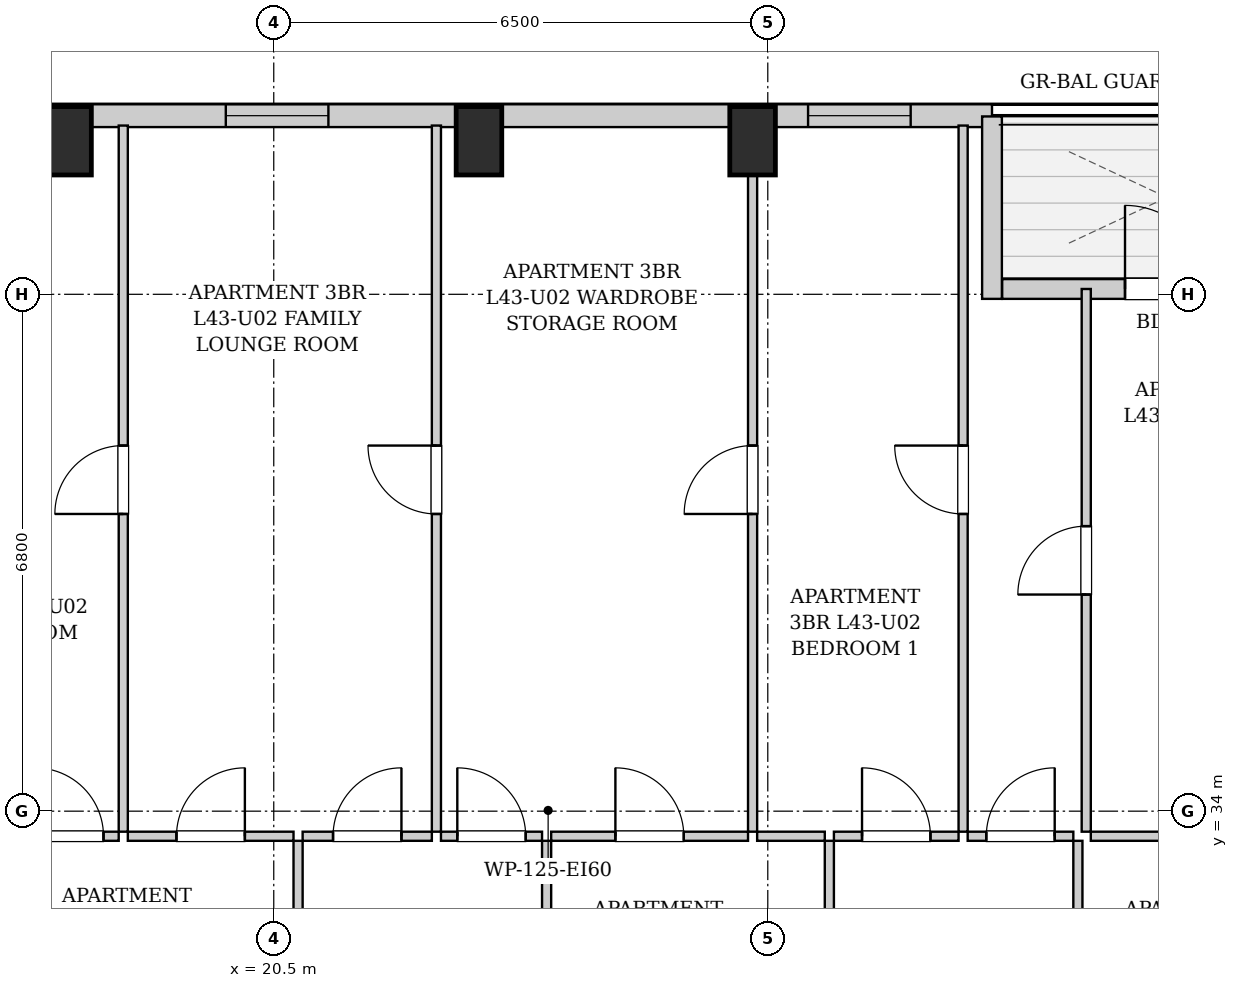
"""IFC4 building model, lengths in metres.
Left out: names, types, materials, properties, quantities, classifications, styles, units other than length and angle.
Written with IfcOpenShell. Run it as: python <this file> out.ifc"""

import sys

from ifc_helpers import new_model, si_unit, direction, frame, frame_2d, origin, origin_2d, place, context, subcontext, project, spatial, rectangle, extrude, element, fill, save


model = new_model("IFC4")
c1 = context("Model", 3, precision=1e-05, world=origin(), true_north=direction((0.0, 1.0)))
c2 = subcontext(c1, "Body", "Model", "MODEL_VIEW")
j1 = project(units=[si_unit("LENGTHUNIT", "METRE"), si_unit("PLANEANGLEUNIT", "RADIAN")], contexts=[c1])
p1 = place(None, origin())
s1 = spatial("IfcSite", under=j1, at=p1, CompositionType="ELEMENT")
p2 = place(p1, origin())
s2 = spatial("IfcBuilding", under=s1, at=p2, CompositionType="ELEMENT")
p3 = place(p2, frame((0.0, 0.0, 150.4)))
s3 = spatial("IfcBuildingStorey", under=s2, at=p3, CompositionType="ELEMENT", Elevation=150.4)
for number, where, z_axis, x_axis in (
    (1, (17.8, 42.82, 0.0), (0.0, 0.0, 1.0), (1.0, 0.0, 0.0)),
    (2, (23.2, 42.82, 0.0), (0.0, 0.0, 1.0), (1.0, 0.0, 0.0)),
    (3, (26.8, 42.82, 0.0), (0.0, 0.0, 1.0), (1.0, 0.0, 0.0)),
):
    element("IfcColumn", number, at=place(p3, frame(where, z_axis=z_axis, x_axis=x_axis)), inside=s3, PredefinedType="COLUMN", context=c2, shape_type="SweptSolid", body=[
        extrude(rectangle(XDim=0.6, YDim=0.9, at=origin_2d()), origin(), (0.0, 0.0, 1.0), 3.25),
    ])
p4 = place(p3, frame((16.6, 43.15, 0.0), z_axis=(0.0, 0.0, 1.0), x_axis=(1.0, 0.0, 0.0)))
e4 = element("IfcWall", 4, at=p4, inside=s3, PredefinedType="SOLIDWALL", context=c2, shape_type="SweptSolid", body=[
    extrude(rectangle(XDim=13.35, YDim=0.3, at=frame_2d((6.675, 0.0))), origin(), (0.0, 0.0, 1.0), 2.99),
])
p5 = place(p4, frame((3.269, 0.0, 0.55)))
e5 = element("IfcOpeningElement", 5, at=p5, cuts=e4, PredefinedType="OPENING", context=c2, shape_type="SweptSolid", body=[
    extrude(rectangle(XDim=1.35, YDim=1.2, at=frame_2d((0.675, 0.6))), frame((0.0, 0.16, 0.0), z_axis=(0.0, -1.0, 0.0), x_axis=(1.0, 0.0, 0.0)), (0.0, 0.0, 1.0), 0.32),
])
p6 = place(p4, frame((10.93, 0.0, 0.55)))
e6 = element("IfcOpeningElement", 6, at=p6, cuts=e4, PredefinedType="OPENING", context=c2, shape_type="SweptSolid", body=[
    extrude(rectangle(XDim=1.35, YDim=1.2, at=frame_2d((0.675, 0.6))), frame((0.0, 0.16, 0.0), z_axis=(0.0, -1.0, 0.0), x_axis=(1.0, 0.0, 0.0)), (0.0, 0.0, 1.0), 0.32),
])
p7 = place(p3, frame((29.95, 43.14, 0.0), z_axis=(0.0, 0.0, 1.0), x_axis=(0.0, -1.0, 0.0)))
e7 = element("IfcWall", 7, at=p7, inside=s3, PredefinedType="SOLIDWALL", context=c2, shape_type="SweptSolid", body=[
    extrude(rectangle(XDim=2.4, YDim=0.26, at=frame_2d((1.2, 0.0))), origin(), (0.0, 0.0, 1.0), 2.99),
])
p8 = place(p3, frame((30.084, 40.87, 0.0), z_axis=(0.0, 0.0, 1.0), x_axis=(1.0, 0.0, 0.0)))
e8 = element("IfcWall", 8, at=p8, inside=s3, PredefinedType="SOLIDWALL", context=c2, shape_type="SweptSolid", body=[
    extrude(rectangle(XDim=4.332, YDim=0.26, at=frame_2d((2.166, 0.0))), origin(), (0.0, 0.0, 1.0), 2.99),
])
p9 = place(p8, frame((1.616, 0.0, 0.0)))
e9 = element("IfcOpeningElement", 9, at=p9, cuts=e8, PredefinedType="OPENING", context=c2, shape_type="SweptSolid", body=[
    extrude(rectangle(XDim=1.1, YDim=2.0, at=frame_2d((0.55, 1.0))), frame((0.0, 0.14, 0.0), z_axis=(0.0, -1.0, 0.0), x_axis=(1.0, 0.0, 0.0)), (0.0, 0.0, 1.0), 0.28),
])
p10 = place(p8, frame((2.876, 0.0, 0.55)))
e10 = element("IfcOpeningElement", 10, at=p10, cuts=e8, PredefinedType="OPENING", context=c2, shape_type="SweptSolid", body=[
    extrude(rectangle(XDim=0.85, YDim=1.2, at=frame_2d((0.425, 0.6))), frame((0.0, 0.14, 0.0), z_axis=(0.0, -1.0, 0.0), x_axis=(1.0, 0.0, 0.0)), (0.0, 0.0, 1.0), 0.28),
])
p11 = place(p3, frame((20.82, 30.76, 0.0), z_axis=(0.0, 0.0, 1.0), x_axis=(0.0, 1.0, 0.0)))
e11 = element("IfcWall", 11, at=p11, inside=s3, PredefinedType="PARTITIONING", context=c2, shape_type="SweptSolid", body=[
    extrude(rectangle(XDim=2.85, YDim=0.12, at=frame_2d((1.425, 0.0))), origin(), (0.0, 0.0, 1.0), 2.99),
])
p12 = place(p11, frame((0.975, 0.0, 0.0)))
e12 = element("IfcOpeningElement", 12, at=p12, cuts=e11, PredefinedType="OPENING", context=c2, shape_type="SweptSolid", body=[
    extrude(rectangle(XDim=0.9, YDim=2.05, at=frame_2d((0.45, 1.025))), frame((0.0, 0.07, 0.0), z_axis=(0.0, -1.0, 0.0), x_axis=(1.0, 0.0, 0.0)), (0.0, 0.0, 1.0), 0.14),
])
p13 = place(p3, frame((17.16, 33.67, 0.0), z_axis=(0.0, 0.0, 1.0), x_axis=(1.0, 0.0, 0.0)))
e13 = element("IfcWall", 13, at=p13, inside=s3, PredefinedType="PARTITIONING", context=c2, shape_type="SweptSolid", body=[
    extrude(rectangle(XDim=1.3, YDim=0.12, at=frame_2d((0.65, 0.0))), origin(), (0.0, 0.0, 1.0), 2.99),
])
p14 = place(p13, frame((0.2, 0.0, 0.0)))
e14 = element("IfcOpeningElement", 14, at=p14, cuts=e13, PredefinedType="OPENING", context=c2, shape_type="SweptSolid", body=[
    extrude(rectangle(XDim=0.9, YDim=2.05, at=frame_2d((0.45, 1.025))), frame((0.0, 0.07, 0.0), z_axis=(0.0, -1.0, 0.0), x_axis=(1.0, 0.0, 0.0)), (0.0, 0.0, 1.0), 0.14),
])
p15 = place(p3, frame((18.58, 33.67, 0.0), z_axis=(0.0, 0.0, 1.0), x_axis=(1.0, 0.0, 0.0)))
e15 = element("IfcWall", 15, at=p15, inside=s3, PredefinedType="PARTITIONING", context=c2, shape_type="SweptSolid", body=[
    extrude(rectangle(XDim=2.18, YDim=0.12, at=frame_2d((1.09, 0.0))), origin(), (0.0, 0.0, 1.0), 2.99),
])
p16 = place(p15, frame((0.64, 0.0, 0.0)))
e16 = element("IfcOpeningElement", 16, at=p16, cuts=e15, PredefinedType="OPENING", context=c2, shape_type="SweptSolid", body=[
    extrude(rectangle(XDim=0.9, YDim=2.05, at=frame_2d((0.45, 1.025))), frame((0.0, 0.07, 0.0), z_axis=(0.0, -1.0, 0.0), x_axis=(1.0, 0.0, 0.0)), (0.0, 0.0, 1.0), 0.14),
])
p17 = place(p3, frame((24.09, 30.76, 0.0), z_axis=(0.0, 0.0, 1.0), x_axis=(0.0, 1.0, 0.0)))
e17 = element("IfcWall", 17, at=p17, inside=s3, PredefinedType="PARTITIONING", context=c2, shape_type="SweptSolid", body=[
    extrude(rectangle(XDim=2.85, YDim=0.12, at=frame_2d((1.425, 0.0))), origin(), (0.0, 0.0, 1.0), 2.99),
])
p18 = place(p17, frame((0.975, 0.0, 0.0)))
e18 = element("IfcOpeningElement", 18, at=p18, cuts=e17, PredefinedType="OPENING", context=c2, shape_type="SweptSolid", body=[
    extrude(rectangle(XDim=0.9, YDim=2.05, at=frame_2d((0.45, 1.025))), frame((0.0, 0.07, 0.0), z_axis=(0.0, -1.0, 0.0), x_axis=(1.0, 0.0, 0.0)), (0.0, 0.0, 1.0), 0.14),
])
p19 = place(p3, frame((20.88, 33.67, 0.0), z_axis=(0.0, 0.0, 1.0), x_axis=(1.0, 0.0, 0.0)))
e19 = element("IfcWall", 19, at=p19, inside=s3, PredefinedType="PARTITIONING", context=c2, shape_type="SweptSolid", body=[
    extrude(rectangle(XDim=1.7, YDim=0.12, at=frame_2d((0.85, 0.0))), origin(), (0.0, 0.0, 1.0), 2.99),
])
p20 = place(p19, frame((0.4, 0.0, 0.0)))
e20 = element("IfcOpeningElement", 20, at=p20, cuts=e19, PredefinedType="OPENING", context=c2, shape_type="SweptSolid", body=[
    extrude(rectangle(XDim=0.9, YDim=2.05, at=frame_2d((0.45, 1.025))), frame((0.0, 0.07, 0.0), z_axis=(0.0, -1.0, 0.0), x_axis=(1.0, 0.0, 0.0)), (0.0, 0.0, 1.0), 0.14),
])
p21 = place(p3, frame((22.7, 33.67, 0.0), z_axis=(0.0, 0.0, 1.0), x_axis=(1.0, 0.0, 0.0)))
e21 = element("IfcWall", 21, at=p21, inside=s3, PredefinedType="PARTITIONING", context=c2, shape_type="SweptSolid", body=[
    extrude(rectangle(XDim=1.33, YDim=0.12, at=frame_2d((0.665, 0.0))), origin(), (0.0, 0.0, 1.0), 2.99),
])
p22 = place(p21, frame((0.215, 0.0, 0.0)))
e22 = element("IfcOpeningElement", 22, at=p22, cuts=e21, PredefinedType="OPENING", context=c2, shape_type="SweptSolid", body=[
    extrude(rectangle(XDim=0.9, YDim=2.05, at=frame_2d((0.45, 1.025))), frame((0.0, 0.07, 0.0), z_axis=(0.0, -1.0, 0.0), x_axis=(1.0, 0.0, 0.0)), (0.0, 0.0, 1.0), 0.14),
])
p23 = place(p3, frame((27.81, 30.76, 0.0), z_axis=(0.0, 0.0, 1.0), x_axis=(0.0, 1.0, 0.0)))
e23 = element("IfcWall", 23, at=p23, inside=s3, PredefinedType="PARTITIONING", context=c2, shape_type="SweptSolid", body=[
    extrude(rectangle(XDim=2.85, YDim=0.12, at=frame_2d((1.425, 0.0))), origin(), (0.0, 0.0, 1.0), 2.99),
])
p24 = place(p23, frame((0.975, 0.0, 0.0)))
e24 = element("IfcOpeningElement", 24, at=p24, cuts=e23, PredefinedType="OPENING", context=c2, shape_type="SweptSolid", body=[
    extrude(rectangle(XDim=0.9, YDim=2.05, at=frame_2d((0.45, 1.025))), frame((0.0, 0.07, 0.0), z_axis=(0.0, -1.0, 0.0), x_axis=(1.0, 0.0, 0.0)), (0.0, 0.0, 1.0), 0.14),
])
p25 = place(p3, frame((24.15, 33.67, 0.0), z_axis=(0.0, 0.0, 1.0), x_axis=(1.0, 0.0, 0.0)))
e25 = element("IfcWall", 25, at=p25, inside=s3, PredefinedType="PARTITIONING", context=c2, shape_type="SweptSolid", body=[
    extrude(rectangle(XDim=2.59, YDim=0.12, at=frame_2d((1.295, 0.0))), origin(), (0.0, 0.0, 1.0), 2.99),
])
p26 = place(p25, frame((0.845, 0.0, 0.0)))
e26 = element("IfcOpeningElement", 26, at=p26, cuts=e25, PredefinedType="OPENING", context=c2, shape_type="SweptSolid", body=[
    extrude(rectangle(XDim=0.9, YDim=2.05, at=frame_2d((0.45, 1.025))), frame((0.0, 0.07, 0.0), z_axis=(0.0, -1.0, 0.0), x_axis=(1.0, 0.0, 0.0)), (0.0, 0.0, 1.0), 0.14),
])
p27 = place(p3, frame((26.86, 33.67, 0.0), z_axis=(0.0, 0.0, 1.0), x_axis=(1.0, 0.0, 0.0)))
e27 = element("IfcWall", 27, at=p27, inside=s3, PredefinedType="PARTITIONING", context=c2, shape_type="SweptSolid", body=[
    extrude(rectangle(XDim=0.89, YDim=0.12, at=frame_2d((0.445, 0.0))), origin(), (0.0, 0.0, 1.0), 2.99),
])
p28 = place(p3, frame((31.08, 30.76, 0.0), z_axis=(0.0, 0.0, 1.0), x_axis=(0.0, 1.0, 0.0)))
e28 = element("IfcWall", 28, at=p28, inside=s3, PredefinedType="PARTITIONING", context=c2, shape_type="SweptSolid", body=[
    extrude(rectangle(XDim=2.85, YDim=0.12, at=frame_2d((1.425, 0.0))), origin(), (0.0, 0.0, 1.0), 2.99),
])
p29 = place(p28, frame((0.975, 0.0, 0.0)))
e29 = element("IfcOpeningElement", 29, at=p29, cuts=e28, PredefinedType="OPENING", context=c2, shape_type="SweptSolid", body=[
    extrude(rectangle(XDim=0.9, YDim=2.05, at=frame_2d((0.45, 1.025))), frame((0.0, 0.07, 0.0), z_axis=(0.0, -1.0, 0.0), x_axis=(1.0, 0.0, 0.0)), (0.0, 0.0, 1.0), 0.14),
])
p30 = place(p3, frame((27.87, 33.67, 0.0), z_axis=(0.0, 0.0, 1.0), x_axis=(1.0, 0.0, 0.0)))
e30 = element("IfcWall", 30, at=p30, inside=s3, PredefinedType="PARTITIONING", context=c2, shape_type="SweptSolid", body=[
    extrude(rectangle(XDim=1.64, YDim=0.12, at=frame_2d((0.82, 0.0))), origin(), (0.0, 0.0, 1.0), 2.99),
])
p31 = place(p30, frame((0.37, 0.0, 0.0)))
e31 = element("IfcOpeningElement", 31, at=p31, cuts=e30, PredefinedType="OPENING", context=c2, shape_type="SweptSolid", body=[
    extrude(rectangle(XDim=0.9, YDim=2.05, at=frame_2d((0.45, 1.025))), frame((0.0, 0.07, 0.0), z_axis=(0.0, -1.0, 0.0), x_axis=(1.0, 0.0, 0.0)), (0.0, 0.0, 1.0), 0.14),
])
p32 = place(p3, frame((29.63, 33.67, 0.0), z_axis=(0.0, 0.0, 1.0), x_axis=(1.0, 0.0, 0.0)))
e32 = element("IfcWall", 32, at=p32, inside=s3, PredefinedType="PARTITIONING", context=c2, shape_type="SweptSolid", body=[
    extrude(rectangle(XDim=1.39, YDim=0.12, at=frame_2d((0.695, 0.0))), origin(), (0.0, 0.0, 1.0), 2.99),
])
p33 = place(p32, frame((0.245, 0.0, 0.0)))
e33 = element("IfcOpeningElement", 33, at=p33, cuts=e32, PredefinedType="OPENING", context=c2, shape_type="SweptSolid", body=[
    extrude(rectangle(XDim=0.9, YDim=2.05, at=frame_2d((0.45, 1.025))), frame((0.0, 0.07, 0.0), z_axis=(0.0, -1.0, 0.0), x_axis=(1.0, 0.0, 0.0)), (0.0, 0.0, 1.0), 0.14),
])
p34 = place(p3, frame((31.25, 33.67, 0.0), z_axis=(0.0, 0.0, 1.0), x_axis=(1.0, 0.0, 0.0)))
e34 = element("IfcWall", 34, at=p34, inside=s3, PredefinedType="PARTITIONING", context=c2, shape_type="SweptSolid", body=[
    extrude(rectangle(XDim=3.44, YDim=0.12, at=frame_2d((1.72, 0.0))), origin(), (0.0, 0.0, 1.0), 2.99),
])
p35 = place(p34, frame((1.27, 0.0, 0.0)))
e35 = element("IfcOpeningElement", 35, at=p35, cuts=e34, PredefinedType="OPENING", context=c2, shape_type="SweptSolid", body=[
    extrude(rectangle(XDim=0.9, YDim=2.05, at=frame_2d((0.45, 1.025))), frame((0.0, 0.07, 0.0), z_axis=(0.0, -1.0, 0.0), x_axis=(1.0, 0.0, 0.0)), (0.0, 0.0, 1.0), 0.14),
])
p36 = place(p3, frame((18.52, 33.73, 0.0), z_axis=(0.0, 0.0, 1.0), x_axis=(0.0, 1.0, 0.0)))
e36 = element("IfcWall", 36, at=p36, inside=s3, PredefinedType="PARTITIONING", context=c2, shape_type="SweptSolid", body=[
    extrude(rectangle(XDim=9.29, YDim=0.12, at=frame_2d((4.645, 0.0))), origin(), (0.0, 0.0, 1.0), 2.99),
])
p37 = place(p36, frame((4.18, 0.0, 0.0)))
e37 = element("IfcOpeningElement", 37, at=p37, cuts=e36, PredefinedType="OPENING", context=c2, shape_type="SweptSolid", body=[
    extrude(rectangle(XDim=0.9, YDim=2.05, at=frame_2d((0.45, 1.025))), frame((0.0, 0.07, 0.0), z_axis=(0.0, -1.0, 0.0), x_axis=(1.0, 0.0, 0.0)), (0.0, 0.0, 1.0), 0.14),
])
p38 = place(p3, frame((22.64, 33.73, 0.0), z_axis=(0.0, 0.0, 1.0), x_axis=(0.0, 1.0, 0.0)))
e38 = element("IfcWall", 38, at=p38, inside=s3, PredefinedType="PARTITIONING", context=c2, shape_type="SweptSolid", body=[
    extrude(rectangle(XDim=9.29, YDim=0.12, at=frame_2d((4.645, 0.0))), origin(), (0.0, 0.0, 1.0), 2.99),
])
p39 = place(p38, frame((4.18, 0.0, 0.0)))
e39 = element("IfcOpeningElement", 39, at=p39, cuts=e38, PredefinedType="OPENING", context=c2, shape_type="SweptSolid", body=[
    extrude(rectangle(XDim=0.9, YDim=2.05, at=frame_2d((0.45, 1.025))), frame((0.0, 0.07, 0.0), z_axis=(0.0, -1.0, 0.0), x_axis=(1.0, 0.0, 0.0)), (0.0, 0.0, 1.0), 0.14),
])
p40 = place(p3, frame((26.8, 33.73, 0.0), z_axis=(0.0, 0.0, 1.0), x_axis=(0.0, 1.0, 0.0)))
e40 = element("IfcWall", 40, at=p40, inside=s3, PredefinedType="PARTITIONING", context=c2, shape_type="SweptSolid", body=[
    extrude(rectangle(XDim=9.29, YDim=0.12, at=frame_2d((4.645, 0.0))), origin(), (0.0, 0.0, 1.0), 2.99),
])
p41 = place(p40, frame((4.18, 0.0, 0.0)))
e41 = element("IfcOpeningElement", 41, at=p41, cuts=e40, PredefinedType="OPENING", context=c2, shape_type="SweptSolid", body=[
    extrude(rectangle(XDim=0.9, YDim=2.05, at=frame_2d((0.45, 1.025))), frame((0.0, 0.07, 0.0), z_axis=(0.0, -1.0, 0.0), x_axis=(1.0, 0.0, 0.0)), (0.0, 0.0, 1.0), 0.14),
])
p42 = place(p3, frame((29.57, 33.73, 0.0), z_axis=(0.0, 0.0, 1.0), x_axis=(0.0, 1.0, 0.0)))
e42 = element("IfcWall", 42, at=p42, inside=s3, PredefinedType="PARTITIONING", context=c2, shape_type="SweptSolid", body=[
    extrude(rectangle(XDim=9.29, YDim=0.12, at=frame_2d((4.645, 0.0))), origin(), (0.0, 0.0, 1.0), 2.99),
])
p43 = place(p42, frame((4.18, 0.0, 0.0)))
e43 = element("IfcOpeningElement", 43, at=p43, cuts=e42, PredefinedType="OPENING", context=c2, shape_type="SweptSolid", body=[
    extrude(rectangle(XDim=0.9, YDim=2.05, at=frame_2d((0.45, 1.025))), frame((0.0, 0.07, 0.0), z_axis=(0.0, -1.0, 0.0), x_axis=(1.0, 0.0, 0.0)), (0.0, 0.0, 1.0), 0.14),
])
p44 = place(p3, frame((31.19, 33.73, 0.0), z_axis=(0.0, 0.0, 1.0), x_axis=(0.0, 1.0, 0.0)))
e44 = element("IfcWall", 44, at=p44, inside=s3, PredefinedType="PARTITIONING", context=c2, shape_type="SweptSolid", body=[
    extrude(rectangle(XDim=7.14, YDim=0.12, at=frame_2d((3.57, 0.0))), origin(), (0.0, 0.0, 1.0), 2.99),
])
p45 = place(p44, frame((3.12, 0.0, 0.0)))
e45 = element("IfcOpeningElement", 45, at=p45, cuts=e44, PredefinedType="OPENING", context=c2, shape_type="SweptSolid", body=[
    extrude(rectangle(XDim=0.9, YDim=2.05, at=frame_2d((0.45, 1.025))), frame((0.0, 0.07, 0.0), z_axis=(0.0, -1.0, 0.0), x_axis=(1.0, 0.0, 0.0)), (0.0, 0.0, 1.0), 0.14),
])
p46 = place(p14, origin())
e46 = element("IfcDoor", 46, at=p46, inside=s3, OperationType="SINGLE_SWING_LEFT", PredefinedType="DOOR", context=c2, shape_type="SweptSolid", body=[
    extrude(rectangle(XDim=0.9, YDim=2.05, at=frame_2d((0.45, 1.025))), frame((0.0, 0.025, 0.0), z_axis=(0.0, -1.0, 0.0), x_axis=(1.0, 0.0, 0.0)), (0.0, 0.0, 1.0), 0.05),
])
fill(e14, e46)
p47 = place(p16, origin())
e47 = element("IfcDoor", 47, at=p47, inside=s3, OperationType="SINGLE_SWING_RIGHT", PredefinedType="DOOR", context=c2, shape_type="SweptSolid", body=[
    extrude(rectangle(XDim=0.9, YDim=2.05, at=frame_2d((0.45, 1.025))), frame((0.0, 0.025, 0.0), z_axis=(0.0, -1.0, 0.0), x_axis=(1.0, 0.0, 0.0)), (0.0, 0.0, 1.0), 0.05),
])
fill(e16, e47)
p48 = place(p20, origin())
e48 = element("IfcDoor", 48, at=p48, inside=s3, OperationType="SINGLE_SWING_RIGHT", PredefinedType="DOOR", context=c2, shape_type="SweptSolid", body=[
    extrude(rectangle(XDim=0.9, YDim=2.05, at=frame_2d((0.45, 1.025))), frame((0.0, 0.025, 0.0), z_axis=(0.0, -1.0, 0.0), x_axis=(1.0, 0.0, 0.0)), (0.0, 0.0, 1.0), 0.05),
])
fill(e20, e48)
p49 = place(p22, origin())
e49 = element("IfcDoor", 49, at=p49, inside=s3, OperationType="SINGLE_SWING_LEFT", PredefinedType="DOOR", context=c2, shape_type="SweptSolid", body=[
    extrude(rectangle(XDim=0.9, YDim=2.05, at=frame_2d((0.45, 1.025))), frame((0.0, 0.025, 0.0), z_axis=(0.0, -1.0, 0.0), x_axis=(1.0, 0.0, 0.0)), (0.0, 0.0, 1.0), 0.05),
])
fill(e22, e49)
p50 = place(p26, origin())
e50 = element("IfcDoor", 50, at=p50, inside=s3, OperationType="SINGLE_SWING_LEFT", PredefinedType="DOOR", context=c2, shape_type="SweptSolid", body=[
    extrude(rectangle(XDim=0.9, YDim=2.05, at=frame_2d((0.45, 1.025))), frame((0.0, 0.025, 0.0), z_axis=(0.0, -1.0, 0.0), x_axis=(1.0, 0.0, 0.0)), (0.0, 0.0, 1.0), 0.05),
])
fill(e26, e50)
p51 = place(p31, origin())
e51 = element("IfcDoor", 51, at=p51, inside=s3, OperationType="SINGLE_SWING_LEFT", PredefinedType="DOOR", context=c2, shape_type="SweptSolid", body=[
    extrude(rectangle(XDim=0.9, YDim=2.05, at=frame_2d((0.45, 1.025))), frame((0.0, 0.025, 0.0), z_axis=(0.0, -1.0, 0.0), x_axis=(1.0, 0.0, 0.0)), (0.0, 0.0, 1.0), 0.05),
])
fill(e31, e51)
p52 = place(p33, origin())
e52 = element("IfcDoor", 52, at=p52, inside=s3, OperationType="SINGLE_SWING_RIGHT", PredefinedType="DOOR", context=c2, shape_type="SweptSolid", body=[
    extrude(rectangle(XDim=0.9, YDim=2.05, at=frame_2d((0.45, 1.025))), frame((0.0, 0.025, 0.0), z_axis=(0.0, -1.0, 0.0), x_axis=(1.0, 0.0, 0.0)), (0.0, 0.0, 1.0), 0.05),
])
fill(e33, e52)
p53 = place(p37, origin())
e53 = element("IfcDoor", 53, at=p53, inside=s3, OperationType="SINGLE_SWING_LEFT", PredefinedType="DOOR", context=c2, shape_type="SweptSolid", body=[
    extrude(rectangle(XDim=0.9, YDim=2.05, at=frame_2d((0.45, 1.025))), frame((0.0, 0.025, 0.0), z_axis=(0.0, -1.0, 0.0), x_axis=(1.0, 0.0, 0.0)), (0.0, 0.0, 1.0), 0.05),
])
fill(e37, e53)
p54 = place(p39, origin())
e54 = element("IfcDoor", 54, at=p54, inside=s3, OperationType="SINGLE_SWING_RIGHT", PredefinedType="DOOR", context=c2, shape_type="SweptSolid", body=[
    extrude(rectangle(XDim=0.9, YDim=2.05, at=frame_2d((0.45, 1.025))), frame((0.0, 0.025, 0.0), z_axis=(0.0, -1.0, 0.0), x_axis=(1.0, 0.0, 0.0)), (0.0, 0.0, 1.0), 0.05),
])
fill(e39, e54)
p55 = place(p41, origin())
e55 = element("IfcDoor", 55, at=p55, inside=s3, OperationType="SINGLE_SWING_LEFT", PredefinedType="DOOR", context=c2, shape_type="SweptSolid", body=[
    extrude(rectangle(XDim=0.9, YDim=2.05, at=frame_2d((0.45, 1.025))), frame((0.0, 0.025, 0.0), z_axis=(0.0, -1.0, 0.0), x_axis=(1.0, 0.0, 0.0)), (0.0, 0.0, 1.0), 0.05),
])
fill(e41, e55)
p56 = place(p43, origin())
e56 = element("IfcDoor", 56, at=p56, inside=s3, OperationType="SINGLE_SWING_RIGHT", PredefinedType="DOOR", context=c2, shape_type="SweptSolid", body=[
    extrude(rectangle(XDim=0.9, YDim=2.05, at=frame_2d((0.45, 1.025))), frame((0.0, 0.025, 0.0), z_axis=(0.0, -1.0, 0.0), x_axis=(1.0, 0.0, 0.0)), (0.0, 0.0, 1.0), 0.05),
])
fill(e43, e56)
p57 = place(p45, origin())
e57 = element("IfcDoor", 57, at=p57, inside=s3, OperationType="SINGLE_SWING_LEFT", PredefinedType="DOOR", context=c2, shape_type="SweptSolid", body=[
    extrude(rectangle(XDim=0.9, YDim=2.05, at=frame_2d((0.45, 1.025))), frame((0.0, 0.025, 0.0), z_axis=(0.0, -1.0, 0.0), x_axis=(1.0, 0.0, 0.0)), (0.0, 0.0, 1.0), 0.05),
])
fill(e45, e57)
p58 = place(p9, origin())
e58 = element("IfcDoor", 58, at=p58, inside=s3, OperationType="SINGLE_SWING_LEFT", PredefinedType="DOOR", context=c2, shape_type="SweptSolid", body=[
    extrude(rectangle(XDim=1.1, YDim=2.0, at=frame_2d((0.55, 1.0))), frame((0.0, 0.025, 0.0), z_axis=(0.0, -1.0, 0.0), x_axis=(1.0, 0.0, 0.0)), (0.0, 0.0, 1.0), 0.05),
])
fill(e9, e58)
p59 = place(p5, origin())
e59 = element("IfcWindow", 59, at=p59, inside=s3, PartitioningType="SINGLE_PANEL", PredefinedType="WINDOW", context=c2, shape_type="SweptSolid", body=[
    extrude(rectangle(XDim=1.35, YDim=1.2, at=frame_2d((0.675, 0.6))), frame((0.0, 0.03, 0.0), z_axis=(0.0, -1.0, 0.0), x_axis=(1.0, 0.0, 0.0)), (0.0, 0.0, 1.0), 0.06),
])
fill(e5, e59)
p60 = place(p6, origin())
e60 = element("IfcWindow", 60, at=p60, inside=s3, PartitioningType="SINGLE_PANEL", PredefinedType="WINDOW", context=c2, shape_type="SweptSolid", body=[
    extrude(rectangle(XDim=1.35, YDim=1.2, at=frame_2d((0.675, 0.6))), frame((0.0, 0.03, 0.0), z_axis=(0.0, -1.0, 0.0), x_axis=(1.0, 0.0, 0.0)), (0.0, 0.0, 1.0), 0.06),
])
fill(e6, e60)
save(model, sys.argv[1])
